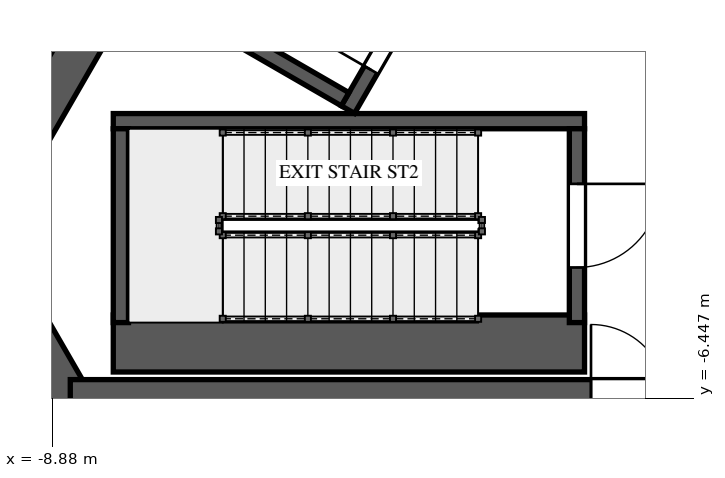
"""IFC4 building model, lengths in metres.
Left out: names, types, materials, properties, quantities, classifications, styles, units other than length and angle.
Written with IfcOpenShell. Run it as: python <this file> out.ifc"""

import sys

from ifc_helpers import new_model, si_unit, direction, frame, frame_2d, origin, place, context, subcontext, project, spatial, rectangle, extrude, element, fill, save


model = new_model("IFC4")
c1 = context("Model", 3, precision=1e-05, world=origin(), true_north=direction((0.0, 1.0)))
c2 = subcontext(c1, "Body", "Model", "MODEL_VIEW")
j1 = project(units=[si_unit("LENGTHUNIT", "METRE"), si_unit("PLANEANGLEUNIT", "RADIAN")], contexts=[c1])
p1 = place(None, origin())
s1 = spatial("IfcSite", under=j1, at=p1, CompositionType="ELEMENT")
p2 = place(p1, origin())
s2 = spatial("IfcBuilding", under=s1, at=p2, CompositionType="ELEMENT")
p3 = place(p2, frame((0.0, 0.0, 352.4)))
s3 = spatial("IfcBuildingStorey", under=s2, at=p3, CompositionType="ELEMENT", Elevation=352.4)
p4 = place(p3, frame((-1.285, 10.725, 0.0), z_axis=(0.0, 0.0, 1.0), x_axis=(-0.499994590896, -0.86602852671, 0.0)))
e1 = element("IfcWall", 1, at=p4, inside=s3, PredefinedType="SHEAR", context=c2, shape_type="SweptSolid", body=[
    extrude(rectangle(XDim=17.292, YDim=0.55, at=frame_2d((8.646, 0.0))), origin(), (0.0, 0.0, 1.0), 4.5),
])
p5 = place(p4, frame((6.851, 0.0, 0.0)))
e2 = element("IfcOpeningElement", 2, at=p5, cuts=e1, PredefinedType="OPENING", context=c2, shape_type="SweptSolid", body=[
    extrude(rectangle(XDim=1.0, YDim=2.4, at=frame_2d((0.5, 1.2))), frame((0.0, 0.285, 0.0), z_axis=(0.0, -1.0, 0.0), x_axis=(1.0, 0.0, 0.0)), (0.0, 0.0, 1.0), 0.57),
])
p6 = place(p3, frame((-10.01, -4.113, 0.0), z_axis=(0.0, 0.0, 1.0), x_axis=(0.499995765644, -0.866027848477, 0.0)))
e3 = element("IfcWall", 3, at=p6, inside=s3, PredefinedType="SHEAR", context=c2, shape_type="SweptSolid", body=[
    extrude(rectangle(XDim=2.887, YDim=0.55, at=frame_2d((1.443, 0.0))), origin(), (0.0, 0.0, 1.0), 4.5),
])
p7 = place(p3, frame((-8.646, -6.475, 0.0), z_axis=(0.0, 0.0, 1.0), x_axis=(1.0, 0.0, 0.0)))
e4 = element("IfcWall", 4, at=p7, inside=s3, PredefinedType="SHEAR", context=c2, shape_type="SweptSolid", body=[
    extrude(rectangle(XDim=17.292, YDim=0.55, at=frame_2d((8.646, 0.0))), origin(), (0.0, 0.0, 1.0), 4.5),
])
p8 = place(p7, frame((6.851, 0.0, 0.0)))
e5 = element("IfcOpeningElement", 5, at=p8, cuts=e4, PredefinedType="OPENING", context=c2, shape_type="SweptSolid", body=[
    extrude(rectangle(XDim=1.0, YDim=2.4, at=frame_2d((0.5, 1.2))), frame((0.0, 0.285, 0.0), z_axis=(0.0, -1.0, 0.0), x_axis=(1.0, 0.0, 0.0)), (0.0, 0.0, 1.0), 0.57),
])
p9 = place(p7, frame((15.089, 0.0, 0.0)))
e6 = element("IfcOpeningElement", 6, at=p9, cuts=e4, PredefinedType="OPENING", context=c2, shape_type="SweptSolid", body=[
    extrude(rectangle(XDim=0.8, YDim=2.1, at=frame_2d((0.4, 1.05))), frame((0.0, 0.285, 0.0), z_axis=(0.0, -1.0, 0.0), x_axis=(1.0, 0.0, 0.0)), (0.0, 0.0, 1.0), 0.57),
])
p10 = place(p3, frame((-8.08, -5.725, 0.0), z_axis=(0.0, 0.0, 1.0), x_axis=(1.0, 0.0, 0.0)))
e7 = element("IfcWall", 7, at=p10, inside=s3, PredefinedType="SOLIDWALL", context=c2, shape_type="SweptSolid", body=[
    extrude(rectangle(XDim=6.2, YDim=0.75, at=frame_2d((3.1, 0.0))), origin(), (0.0, 0.0, 1.0), 4.15),
])
p11 = place(p3, frame((-8.08, -2.8, 0.0), z_axis=(0.0, 0.0, 1.0), x_axis=(1.0, 0.0, 0.0)))
e8 = element("IfcWall", 8, at=p11, inside=s3, PredefinedType="SOLIDWALL", context=c2, shape_type="SweptSolid", body=[
    extrude(rectangle(XDim=6.2, YDim=0.2, at=frame_2d((3.1, 0.0))), origin(), (0.0, 0.0, 1.0), 4.15),
])
p12 = place(p3, frame((-7.98, -2.9, 0.0), z_axis=(0.0, 0.0, 1.0), x_axis=(0.0, -1.0, 0.0)))
e9 = element("IfcWall", 9, at=p12, inside=s3, PredefinedType="SOLIDWALL", context=c2, shape_type="SweptSolid", body=[
    extrude(rectangle(XDim=2.55, YDim=0.2, at=frame_2d((1.275, 0.0))), origin(), (0.0, 0.0, 1.0), 4.15),
])
p13 = place(p3, frame((-1.98, -2.9, 0.0), z_axis=(0.0, 0.0, 1.0), x_axis=(0.0, -1.0, 0.0)))
e10 = element("IfcWall", 10, at=p13, inside=s3, PredefinedType="SOLIDWALL", context=c2, shape_type="SweptSolid", body=[
    extrude(rectangle(XDim=2.55, YDim=0.2, at=frame_2d((1.275, 0.0))), origin(), (0.0, 0.0, 1.0), 4.15),
])
p14 = place(p13, frame((0.725, 0.0, 0.0)))
e11 = element("IfcOpeningElement", 11, at=p14, cuts=e10, PredefinedType="OPENING", context=c2, shape_type="SweptSolid", body=[
    extrude(rectangle(XDim=1.1, YDim=2.4, at=frame_2d((0.55, 1.2))), frame((0.0, 0.11, 0.0), z_axis=(0.0, -1.0, 0.0), x_axis=(1.0, 0.0, 0.0)), (0.0, 0.0, 1.0), 0.22),
])
p15 = place(p3, frame((-4.993, -2.648, 0.0), z_axis=(0.0, 0.0, 1.0), x_axis=(0.499996545922, 0.866027397988, 0.0)))
e12 = element("IfcWall", 12, at=p15, inside=s3, PredefinedType="SOLIDWALL", context=c2, shape_type="SweptSolid", body=[
    extrude(rectangle(XDim=5.5, YDim=0.2, at=frame_2d((2.75, 0.0))), origin(), (0.0, 0.0, 1.0), 4.15),
])
p16 = place(p15, frame((3.12, 0.0, 0.0)))
e13 = element("IfcOpeningElement", 13, at=p16, cuts=e12, PredefinedType="OPENING", context=c2, shape_type="SweptSolid", body=[
    extrude(rectangle(XDim=0.95, YDim=2.4, at=frame_2d((0.475, 1.2))), frame((0.0, 0.11, 0.0), z_axis=(0.0, -1.0, 0.0), x_axis=(1.0, 0.0, 0.0)), (0.0, 0.0, 1.0), 0.22),
])
p17 = place(p15, frame((0.605, 0.0, 0.0)))
e14 = element("IfcOpeningElement", 14, at=p17, cuts=e12, PredefinedType="OPENING", context=c2, shape_type="SweptSolid", body=[
    extrude(rectangle(XDim=0.8, YDim=2.1, at=frame_2d((0.4, 1.05))), frame((0.0, 0.11, 0.0), z_axis=(0.0, -1.0, 0.0), x_axis=(1.0, 0.0, 0.0)), (0.0, 0.0, 1.0), 0.22),
])
p18 = place(p3, frame((-5.03, -2.512, 0.0), z_axis=(0.0, 0.0, 1.0), x_axis=(-0.866016039709, 0.500016218704, 0.0)))
e15 = element("IfcWall", 15, at=p18, inside=s3, PredefinedType="SOLIDWALL", context=c2, shape_type="SweptSolid", body=[
    extrude(rectangle(XDim=2.35, YDim=0.2, at=frame_2d((1.175, 0.0))), origin(), (0.0, 0.0, 1.0), 4.15),
])
p19 = place(p14, origin())
e16 = element("IfcDoor", 16, at=p19, inside=s3, OperationType="SINGLE_SWING_LEFT", PredefinedType="DOOR", context=c2, shape_type="SweptSolid", body=[
    extrude(rectangle(XDim=1.1, YDim=2.4, at=frame_2d((0.55, 1.2))), frame((0.0, 0.025, 0.0), z_axis=(0.0, -1.0, 0.0), x_axis=(1.0, 0.0, 0.0)), (0.0, 0.0, 1.0), 0.05),
])
fill(e11, e16)
p20 = place(p17, origin())
e17 = element("IfcDoor", 17, at=p20, inside=s3, OperationType="SINGLE_SWING_RIGHT", PredefinedType="DOOR", context=c2, shape_type="SweptSolid", body=[
    extrude(rectangle(XDim=0.8, YDim=2.1, at=frame_2d((0.4, 1.05))), frame((0.0, 0.025, 0.0), z_axis=(0.0, -1.0, 0.0), x_axis=(1.0, 0.0, 0.0)), (0.0, 0.0, 1.0), 0.05),
])
fill(e14, e17)
save(model, sys.argv[1])
